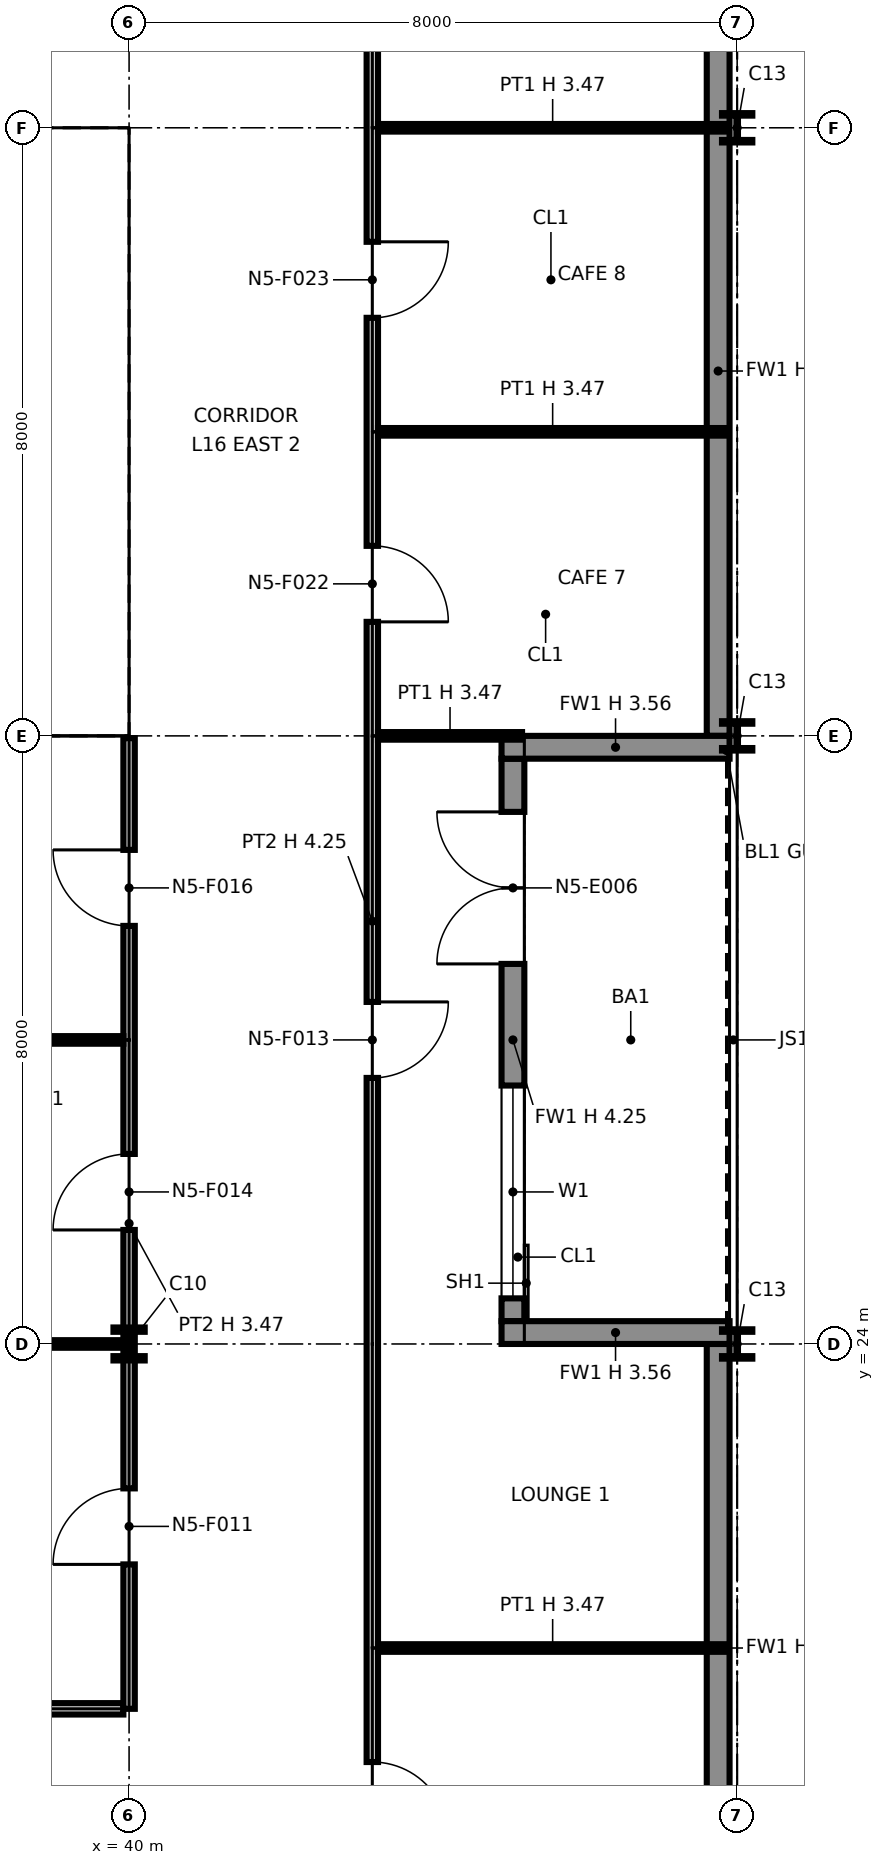
"""IFC4 building model, lengths in metres.
Left out: names, types, materials, properties, quantities, classifications, styles, units other than length and angle.
Written with IfcOpenShell. Run it as: python <this file> out.ifc"""

import sys

from ifc_helpers import new_model, si_unit, direction, frame, frame_2d, origin, origin_2d, place, context, subcontext, project, spatial, polyline, rectangle, i_section, outline, extrude, element, fill, save


model = new_model("IFC4")
c1 = context("Model", 3, precision=1e-05, world=origin(), true_north=direction((0.0, 1.0)))
c2 = subcontext(c1, "Body", "Model", "MODEL_VIEW")
j1 = project(units=[si_unit("LENGTHUNIT", "METRE"), si_unit("PLANEANGLEUNIT", "RADIAN")], contexts=[c1])
p1 = place(None, origin())
s1 = spatial("IfcSite", under=j1, at=p1, CompositionType="ELEMENT")
p2 = place(p1, origin())
s2 = spatial("IfcBuilding", under=s1, at=p2, CompositionType="ELEMENT")
p3 = place(p2, frame((0.0, 0.0, 87.6)))
s3 = spatial("IfcBuildingStorey", under=s2, at=p3, CompositionType="ELEMENT", Elevation=87.6)
p4 = place(p3, frame((40.0, 24.0, 0.0), z_axis=(0.0, 0.0, 1.0), x_axis=(1.0, 0.0, 0.0)))
e1 = element("IfcColumn", 1, at=p4, inside=s3, PredefinedType="COLUMN", context=c2, shape_type="SweptSolid", body=[
    extrude(i_section(OverallWidth=0.411, OverallDepth=0.434, WebThickness=0.036, FlangeThickness=0.057, at=origin_2d()), origin(), (0.0, 0.0, 1.0), 4.25),
])
for number, where, z_axis, x_axis in (
    (2, (40.0, 32.0, 0.0), (0.0, 0.0, 1.0), (1.0, 0.0, 0.0)),
    (3, (40.0, 40.0, 0.0), (0.0, 0.0, 1.0), (1.0, 0.0, 0.0)),
):
    element("IfcColumn", number, at=place(p3, frame(where, z_axis=z_axis, x_axis=x_axis)), inside=s3, PredefinedType="COLUMN", context=c2, shape_type="SweptSolid", body=[
        extrude(i_section(OverallWidth=0.257, OverallDepth=0.363, WebThickness=0.013, FlangeThickness=0.022, at=origin_2d()), origin(), (0.0, 0.0, 1.0), 4.25),
    ])
for number, where, z_axis, x_axis in (
    (4, (48.0, 24.0, 0.0), (0.0, 0.0, 1.0), (1.0, 0.0, 0.0)),
    (5, (48.0, 32.0, 0.0), (0.0, 0.0, 1.0), (1.0, 0.0, 0.0)),
    (6, (48.0, 40.0, 0.0), (0.0, 0.0, 1.0), (1.0, 0.0, 0.0)),
):
    element("IfcColumn", number, at=place(p3, frame(where, z_axis=z_axis, x_axis=x_axis)), inside=s3, PredefinedType="COLUMN", context=c2, shape_type="SweptSolid", body=[
        extrude(i_section(OverallWidth=0.399, OverallDepth=0.386, WebThickness=0.021, FlangeThickness=0.033, at=origin_2d()), origin(), (0.0, 0.0, 1.0), 4.25),
    ])
p5 = place(p3, frame((47.75, 16.0, 0.0), z_axis=(0.0, 0.0, 1.0), x_axis=(0.0, 1.0, 0.0)))
e7 = element("IfcWall", 7, at=p5, inside=s3, PredefinedType="SOLIDWALL", context=c2, shape_type="SweptSolid", body=[
    extrude(rectangle(XDim=8.0, YDim=0.3, at=frame_2d((4.0, 0.0))), origin(), (0.0, 0.0, 1.0), 4.25),
])
p6 = place(p3, frame((45.05, 24.3, 0.0), z_axis=(0.0, 0.0, 1.0), x_axis=(0.0, 1.0, 0.0)))
e8 = element("IfcWall", 8, at=p6, inside=s3, PredefinedType="SOLIDWALL", context=c2, shape_type="SweptSolid", body=[
    extrude(rectangle(XDim=7.4, YDim=0.3, at=frame_2d((3.7, 0.0))), origin(), (0.0, 0.0, 1.0), 4.25),
])
p7 = place(p6, frame((0.3, 0.0, 0.9)))
e9 = element("IfcOpeningElement", 9, at=p7, cuts=e8, PredefinedType="OPENING", context=c2, shape_type="SweptSolid", body=[
    extrude(rectangle(XDim=2.8, YDim=2.2, at=frame_2d((1.4, 1.1))), frame((0.0, 0.16, 0.0), z_axis=(0.0, -1.0, 0.0), x_axis=(1.0, 0.0, 0.0)), (0.0, 0.0, 1.0), 0.32),
])
p8 = place(p6, frame((4.7, 0.0, 0.0)))
e10 = element("IfcOpeningElement", 10, at=p8, cuts=e8, PredefinedType="OPENING", context=c2, shape_type="SweptSolid", body=[
    extrude(rectangle(XDim=2.0, YDim=2.4, at=frame_2d((1.0, 1.2))), frame((0.0, 0.16, 0.0), z_axis=(0.0, -1.0, 0.0), x_axis=(1.0, 0.0, 0.0)), (0.0, 0.0, 1.0), 0.32),
])
for number, where, z_axis, x_axis in (
    (11, (47.9, 24.15, 0.0), (0.0, 0.0, 1.0), (-1.0, 0.0, 0.0)),
    (12, (47.9, 31.85, 0.0), (0.0, 0.0, 1.0), (-1.0, 0.0, 0.0)),
):
    element("IfcWall", number, at=place(p3, frame(where, z_axis=z_axis, x_axis=x_axis)), inside=s3, PredefinedType="SOLIDWALL", context=c2, shape_type="SweptSolid", body=[
        extrude(rectangle(XDim=3.0, YDim=0.3, at=frame_2d((1.5, 0.0))), origin(), (0.0, 0.0, 1.0), 3.556),
    ])
p9 = place(p3, frame((47.75, 32.0, 0.0), z_axis=(0.0, 0.0, 1.0), x_axis=(0.0, 1.0, 0.0)))
e13 = element("IfcWall", 13, at=p9, inside=s3, PredefinedType="SOLIDWALL", context=c2, shape_type="SweptSolid", body=[
    extrude(rectangle(XDim=9.6, YDim=0.3, at=frame_2d((4.8, 0.0))), origin(), (0.0, 0.0, 1.0), 4.25),
])
p10 = place(p3, frame((24.65, 32.75, 0.0), z_axis=(0.0, 0.0, 1.0), x_axis=(1.0, 0.0, 0.0)))
e14 = element("IfcWall", 14, at=p10, inside=s3, PredefinedType="PARTITIONING", context=c2, shape_type="SweptSolid", body=[
    extrude(outline(polyline([(0.0, 0.0), (14.7, 0.0), (14.7, 4.25), (7.469, 4.25), (7.469, 3.632), (7.231, 3.632), (7.23, 4.25), (0.0, 4.25), (0.0, 0.0)])), frame((0.0, 0.1, 0.0), z_axis=(0.0, -1.0, 0.0), x_axis=(1.0, 0.0, 0.0)), (0.0, 0.0, 1.0), 0.2),
])
p11 = place(p10, frame((4.1, 0.0, 0.0)))
e15 = element("IfcOpeningElement", 15, at=p11, cuts=e14, PredefinedType="OPENING", context=c2, shape_type="SweptSolid", body=[
    extrude(rectangle(XDim=1.8, YDim=2.1, at=frame_2d((0.9, 1.05))), frame((0.0, 0.11, 0.0), z_axis=(0.0, -1.0, 0.0), x_axis=(1.0, 0.0, 0.0)), (0.0, 0.0, 1.0), 0.22),
])
p12 = place(p10, frame((8.55, 0.0, 0.0)))
e16 = element("IfcOpeningElement", 16, at=p12, cuts=e14, PredefinedType="OPENING", context=c2, shape_type="SweptSolid", body=[
    extrude(rectangle(XDim=1.4, YDim=2.1, at=frame_2d((0.7, 1.05))), frame((0.0, 0.11, 0.0), z_axis=(0.0, -1.0, 0.0), x_axis=(1.0, 0.0, 0.0)), (0.0, 0.0, 1.0), 0.22),
])
p13 = place(p10, frame((12.0, 0.0, 0.0)))
e17 = element("IfcOpeningElement", 17, at=p13, cuts=e14, PredefinedType="OPENING", context=c2, shape_type="SweptSolid", body=[
    extrude(rectangle(XDim=1.4, YDim=2.1, at=frame_2d((0.7, 1.05))), frame((0.0, 0.11, 0.0), z_axis=(0.0, -1.0, 0.0), x_axis=(1.0, 0.0, 0.0)), (0.0, 0.0, 1.0), 0.22),
])
p14 = place(p3, frame((24.65, 39.25, 0.0), z_axis=(0.0, 0.0, 1.0), x_axis=(1.0, 0.0, 0.0)))
e18 = element("IfcWall", 18, at=p14, inside=s3, PredefinedType="PARTITIONING", context=c2, shape_type="SweptSolid", body=[
    extrude(outline(polyline([(0.0, 0.0), (14.7, 0.0), (14.7, 4.25), (7.469, 4.25), (7.469, 3.632), (7.231, 3.632), (7.23, 4.25), (0.0, 4.25), (0.0, 0.0)])), frame((0.0, 0.1, 0.0), z_axis=(0.0, -1.0, 0.0), x_axis=(1.0, 0.0, 0.0)), (0.0, 0.0, 1.0), 0.2),
])
p15 = place(p3, frame((39.25, 32.85, 0.0), z_axis=(0.0, 0.0, 1.0), x_axis=(0.0, 1.0, 0.0)))
e19 = element("IfcWall", 19, at=p15, inside=s3, PredefinedType="PARTITIONING", context=c2, shape_type="SweptSolid", body=[
    extrude(rectangle(XDim=6.3, YDim=0.2, at=frame_2d((3.15, 0.0))), origin(), (0.0, 0.0, 1.0), 4.25),
])
p16 = place(p3, frame((43.2, 16.0, 0.0), z_axis=(0.0, 0.0, 1.0), x_axis=(0.0, 1.0, 0.0)))
e20 = element("IfcWall", 20, at=p16, inside=s3, PredefinedType="PARTITIONING", context=c2, shape_type="SweptSolid", body=[
    extrude(outline(polyline([(0.0, 0.0), (27.125, 0.0), (27.125, 4.25), (24.3, 4.25), (24.298, 3.47), (23.702, 3.47), (23.7, 4.25), (20.3, 4.25), (20.298, 3.47), (19.702, 3.47), (19.7, 4.25), (16.3, 4.25), (16.298, 3.47), (15.702, 3.47), (15.7, 4.25), (12.3, 4.25), (12.298, 3.47), (11.702, 3.47), (11.7, 4.25), (8.3, 4.25), (8.298, 3.47), (7.702, 3.47), (7.7, 4.25), (4.3, 4.25), (4.298, 3.47), (3.702, 3.47), (3.7, 4.25), (0.0, 4.25), (0.0, 0.0)])), frame((0.0, 0.075, 0.0), z_axis=(0.0, -1.0, 0.0), x_axis=(1.0, 0.0, 0.0)), (0.0, 0.0, 1.0), 0.15),
])
p17 = place(p16, frame((2.5, 0.0, 0.0), z_axis=(0.0, 0.0, 1.0), x_axis=(-1.0, 0.0, 0.0)))
e21 = element("IfcOpeningElement", 21, at=p17, cuts=e20, PredefinedType="OPENING", context=c2, shape_type="SweptSolid", body=[
    extrude(rectangle(XDim=1.0, YDim=2.1, at=frame_2d((0.5, 1.05))), frame((0.0, 0.085, 0.0), z_axis=(0.0, -1.0, 0.0), x_axis=(1.0, 0.0, 0.0)), (0.0, 0.0, 1.0), 0.17),
])
p18 = place(p16, frame((12.5, 0.0, 0.0), z_axis=(0.0, 0.0, 1.0), x_axis=(-1.0, 0.0, 0.0)))
e22 = element("IfcOpeningElement", 22, at=p18, cuts=e20, PredefinedType="OPENING", context=c2, shape_type="SweptSolid", body=[
    extrude(rectangle(XDim=1.0, YDim=2.1, at=frame_2d((0.5, 1.05))), frame((0.0, 0.085, 0.0), z_axis=(0.0, -1.0, 0.0), x_axis=(1.0, 0.0, 0.0)), (0.0, 0.0, 1.0), 0.17),
])
p19 = place(p16, frame((18.5, 0.0, 0.0), z_axis=(0.0, 0.0, 1.0), x_axis=(-1.0, 0.0, 0.0)))
e23 = element("IfcOpeningElement", 23, at=p19, cuts=e20, PredefinedType="OPENING", context=c2, shape_type="SweptSolid", body=[
    extrude(rectangle(XDim=1.0, YDim=2.1, at=frame_2d((0.5, 1.05))), frame((0.0, 0.085, 0.0), z_axis=(0.0, -1.0, 0.0), x_axis=(1.0, 0.0, 0.0)), (0.0, 0.0, 1.0), 0.17),
])
p20 = place(p16, frame((22.5, 0.0, 0.0), z_axis=(0.0, 0.0, 1.0), x_axis=(-1.0, 0.0, 0.0)))
e24 = element("IfcOpeningElement", 24, at=p20, cuts=e20, PredefinedType="OPENING", context=c2, shape_type="SweptSolid", body=[
    extrude(rectangle(XDim=1.0, YDim=2.1, at=frame_2d((0.5, 1.05))), frame((0.0, 0.085, 0.0), z_axis=(0.0, -1.0, 0.0), x_axis=(1.0, 0.0, 0.0)), (0.0, 0.0, 1.0), 0.17),
])
p21 = place(p16, frame((26.1, 0.0, 0.0), z_axis=(0.0, 0.0, 1.0), x_axis=(-1.0, 0.0, 0.0)))
e25 = element("IfcOpeningElement", 25, at=p21, cuts=e20, PredefinedType="OPENING", context=c2, shape_type="SweptSolid", body=[
    extrude(rectangle(XDim=1.0, YDim=2.1, at=frame_2d((0.5, 1.05))), frame((0.0, 0.085, 0.0), z_axis=(0.0, -1.0, 0.0), x_axis=(1.0, 0.0, 0.0)), (0.0, 0.0, 1.0), 0.17),
])
p22 = place(p3, frame((27.2, 19.2, 0.0), z_axis=(0.0, 0.0, 1.0), x_axis=(1.0, 0.0, 0.0)))
e26 = element("IfcWall", 26, at=p22, inside=s3, PredefinedType="PARTITIONING", context=c2, shape_type="SweptSolid", body=[
    extrude(rectangle(XDim=12.725, YDim=0.15, at=frame_2d((6.363, 0.0))), origin(), (0.0, 0.0, 1.0), 4.25),
])
p23 = place(p22, frame((1.9, 0.0, 0.0)))
e27 = element("IfcOpeningElement", 27, at=p23, cuts=e26, PredefinedType="OPENING", context=c2, shape_type="SweptSolid", body=[
    extrude(rectangle(XDim=1.0, YDim=2.1, at=frame_2d((0.5, 1.05))), frame((0.0, 0.085, 0.0), z_axis=(0.0, -1.0, 0.0), x_axis=(1.0, 0.0, 0.0)), (0.0, 0.0, 1.0), 0.17),
])
p24 = place(p22, frame((6.3, 0.0, 0.0)))
e28 = element("IfcOpeningElement", 28, at=p24, cuts=e26, PredefinedType="OPENING", context=c2, shape_type="SweptSolid", body=[
    extrude(rectangle(XDim=1.0, YDim=2.1, at=frame_2d((0.5, 1.05))), frame((0.0, 0.085, 0.0), z_axis=(0.0, -1.0, 0.0), x_axis=(1.0, 0.0, 0.0)), (0.0, 0.0, 1.0), 0.17),
])
p25 = place(p3, frame((40.0, 19.2, 0.0), z_axis=(0.0, 0.0, 1.0), x_axis=(0.0, 1.0, 0.0)))
e29 = element("IfcWall", 29, at=p25, inside=s3, PredefinedType="PARTITIONING", context=c2, shape_type="SweptSolid", body=[
    extrude(rectangle(XDim=12.77, YDim=0.15, at=frame_2d((6.385, 0.0))), origin(), (0.0, 0.0, 1.0), 3.47),
])
p26 = place(p25, frame((1.9, 0.0, 0.0)))
e30 = element("IfcOpeningElement", 30, at=p26, cuts=e29, PredefinedType="OPENING", context=c2, shape_type="SweptSolid", body=[
    extrude(rectangle(XDim=1.0, YDim=2.1, at=frame_2d((0.5, 1.05))), frame((0.0, 0.085, 0.0), z_axis=(0.0, -1.0, 0.0), x_axis=(1.0, 0.0, 0.0)), (0.0, 0.0, 1.0), 0.17),
])
p27 = place(p25, frame((6.3, 0.0, 0.0)))
e31 = element("IfcOpeningElement", 31, at=p27, cuts=e29, PredefinedType="OPENING", context=c2, shape_type="SweptSolid", body=[
    extrude(rectangle(XDim=1.0, YDim=2.1, at=frame_2d((0.5, 1.05))), frame((0.0, 0.085, 0.0), z_axis=(0.0, -1.0, 0.0), x_axis=(1.0, 0.0, 0.0)), (0.0, 0.0, 1.0), 0.17),
])
p28 = place(p25, frame((10.3, 0.0, 0.0)))
e32 = element("IfcOpeningElement", 32, at=p28, cuts=e29, PredefinedType="OPENING", context=c2, shape_type="SweptSolid", body=[
    extrude(rectangle(XDim=1.0, YDim=2.1, at=frame_2d((0.5, 1.05))), frame((0.0, 0.085, 0.0), z_axis=(0.0, -1.0, 0.0), x_axis=(1.0, 0.0, 0.0)), (0.0, 0.0, 1.0), 0.17),
])
p29 = place(p3, frame((43.275, 20.0, 0.0), z_axis=(0.0, 0.0, 1.0), x_axis=(1.0, 0.0, 0.0)))
e33 = element("IfcWall", 33, at=p29, inside=s3, PredefinedType="PARTITIONING", context=c2, shape_type="SweptSolid", body=[
    extrude(rectangle(XDim=4.595, YDim=0.1, at=frame_2d((2.298, 0.0))), origin(), (0.0, 0.0, 1.0), 3.47),
])
p30 = place(p3, frame((37.05, 24.0, 0.0), z_axis=(0.0, 0.0, 1.0), x_axis=(1.0, 0.0, 0.0)))
e34 = element("IfcWall", 34, at=p30, inside=s3, PredefinedType="PARTITIONING", context=c2, shape_type="SweptSolid", body=[
    extrude(rectangle(XDim=2.875, YDim=0.1, at=frame_2d((1.438, 0.0))), origin(), (0.0, 0.0, 1.0), 3.47),
])
p31 = place(p3, frame((37.0, 28.0, 0.0), z_axis=(0.0, 0.0, 1.0), x_axis=(1.0, 0.0, 0.0)))
e35 = element("IfcWall", 35, at=p31, inside=s3, PredefinedType="PARTITIONING", context=c2, shape_type="SweptSolid", body=[
    extrude(rectangle(XDim=2.925, YDim=0.1, at=frame_2d((1.462, 0.0))), origin(), (0.0, 0.0, 1.0), 3.47),
])
p32 = place(p3, frame((43.275, 32.0, 0.0), z_axis=(0.0, 0.0, 1.0), x_axis=(1.0, 0.0, 0.0)))
e36 = element("IfcWall", 36, at=p32, inside=s3, PredefinedType="PARTITIONING", context=c2, shape_type="SweptSolid", body=[
    extrude(rectangle(XDim=1.895, YDim=0.1, at=frame_2d((0.948, 0.0))), origin(), (0.0, 0.0, 1.0), 3.47),
])
for number, where, z_axis, x_axis in (
    (37, (43.275, 36.0, 0.0), (0.0, 0.0, 1.0), (1.0, 0.0, 0.0)),
    (38, (43.275, 40.0, 0.0), (0.0, 0.0, 1.0), (1.0, 0.0, 0.0)),
):
    element("IfcWall", number, at=place(p3, frame(where, z_axis=z_axis, x_axis=x_axis)), inside=s3, PredefinedType="PARTITIONING", context=c2, shape_type="SweptSolid", body=[
        extrude(rectangle(XDim=4.595, YDim=0.1, at=frame_2d((2.298, 0.0))), origin(), (0.0, 0.0, 1.0), 3.47),
    ])
p33 = place(p7, origin())
e39 = element("IfcWindow", 39, at=p33, inside=s3, PartitioningType="SINGLE_PANEL", PredefinedType="WINDOW", context=c2, shape_type="SweptSolid", body=[
    extrude(rectangle(XDim=2.8, YDim=2.2, at=frame_2d((1.4, 1.1))), frame((0.0, 0.03, 0.0), z_axis=(0.0, -1.0, 0.0), x_axis=(1.0, 0.0, 0.0)), (0.0, 0.0, 1.0), 0.06),
])
fill(e9, e39)
p34 = place(p8, origin())
e40 = element("IfcDoor", 40, at=p34, inside=s3, OperationType="DOUBLE_DOOR_SINGLE_SWING", PredefinedType="DOOR", context=c2, shape_type="SweptSolid", body=[
    extrude(rectangle(XDim=2.0, YDim=2.4, at=frame_2d((1.0, 1.2))), frame((0.0, 0.025, 0.0), z_axis=(0.0, -1.0, 0.0), x_axis=(1.0, 0.0, 0.0)), (0.0, 0.0, 1.0), 0.05),
])
fill(e10, e40)
p35 = place(p26, origin())
e41 = element("IfcDoor", 41, at=p35, inside=s3, OperationType="SINGLE_SWING_LEFT", PredefinedType="DOOR", context=c2, shape_type="SweptSolid", body=[
    extrude(rectangle(XDim=1.0, YDim=2.1, at=frame_2d((0.5, 1.05))), frame((0.0, 0.025, 0.0), z_axis=(0.0, -1.0, 0.0), x_axis=(1.0, 0.0, 0.0)), (0.0, 0.0, 1.0), 0.05),
])
fill(e30, e41)
p36 = place(p17, origin())
e42 = element("IfcDoor", 42, at=p36, inside=s3, OperationType="SINGLE_SWING_RIGHT", PredefinedType="DOOR", context=c2, shape_type="SweptSolid", body=[
    extrude(rectangle(XDim=1.0, YDim=2.1, at=frame_2d((0.5, 1.05))), frame((0.0, 0.025, 0.0), z_axis=(0.0, -1.0, 0.0), x_axis=(1.0, 0.0, 0.0)), (0.0, 0.0, 1.0), 0.05),
])
fill(e21, e42)
p37 = place(p18, origin())
e43 = element("IfcDoor", 43, at=p37, inside=s3, OperationType="SINGLE_SWING_LEFT", PredefinedType="DOOR", context=c2, shape_type="SweptSolid", body=[
    extrude(rectangle(XDim=1.0, YDim=2.1, at=frame_2d((0.5, 1.05))), frame((0.0, 0.025, 0.0), z_axis=(0.0, -1.0, 0.0), x_axis=(1.0, 0.0, 0.0)), (0.0, 0.0, 1.0), 0.05),
])
fill(e22, e43)
p38 = place(p27, origin())
e44 = element("IfcDoor", 44, at=p38, inside=s3, OperationType="SINGLE_SWING_LEFT", PredefinedType="DOOR", context=c2, shape_type="SweptSolid", body=[
    extrude(rectangle(XDim=1.0, YDim=2.1, at=frame_2d((0.5, 1.05))), frame((0.0, 0.025, 0.0), z_axis=(0.0, -1.0, 0.0), x_axis=(1.0, 0.0, 0.0)), (0.0, 0.0, 1.0), 0.05),
])
fill(e31, e44)
p39 = place(p28, origin())
e45 = element("IfcDoor", 45, at=p39, inside=s3, OperationType="SINGLE_SWING_RIGHT", PredefinedType="DOOR", context=c2, shape_type="SweptSolid", body=[
    extrude(rectangle(XDim=1.0, YDim=2.1, at=frame_2d((0.5, 1.05))), frame((0.0, 0.025, 0.0), z_axis=(0.0, -1.0, 0.0), x_axis=(1.0, 0.0, 0.0)), (0.0, 0.0, 1.0), 0.05),
])
fill(e32, e45)
p40 = place(p19, origin())
e46 = element("IfcDoor", 46, at=p40, inside=s3, OperationType="SINGLE_SWING_RIGHT", PredefinedType="DOOR", context=c2, shape_type="SweptSolid", body=[
    extrude(rectangle(XDim=1.0, YDim=2.1, at=frame_2d((0.5, 1.05))), frame((0.0, 0.025, 0.0), z_axis=(0.0, -1.0, 0.0), x_axis=(1.0, 0.0, 0.0)), (0.0, 0.0, 1.0), 0.05),
])
fill(e23, e46)
p41 = place(p20, origin())
e47 = element("IfcDoor", 47, at=p41, inside=s3, OperationType="SINGLE_SWING_LEFT", PredefinedType="DOOR", context=c2, shape_type="SweptSolid", body=[
    extrude(rectangle(XDim=1.0, YDim=2.1, at=frame_2d((0.5, 1.05))), frame((0.0, 0.025, 0.0), z_axis=(0.0, -1.0, 0.0), x_axis=(1.0, 0.0, 0.0)), (0.0, 0.0, 1.0), 0.05),
])
fill(e24, e47)
save(model, sys.argv[1])
